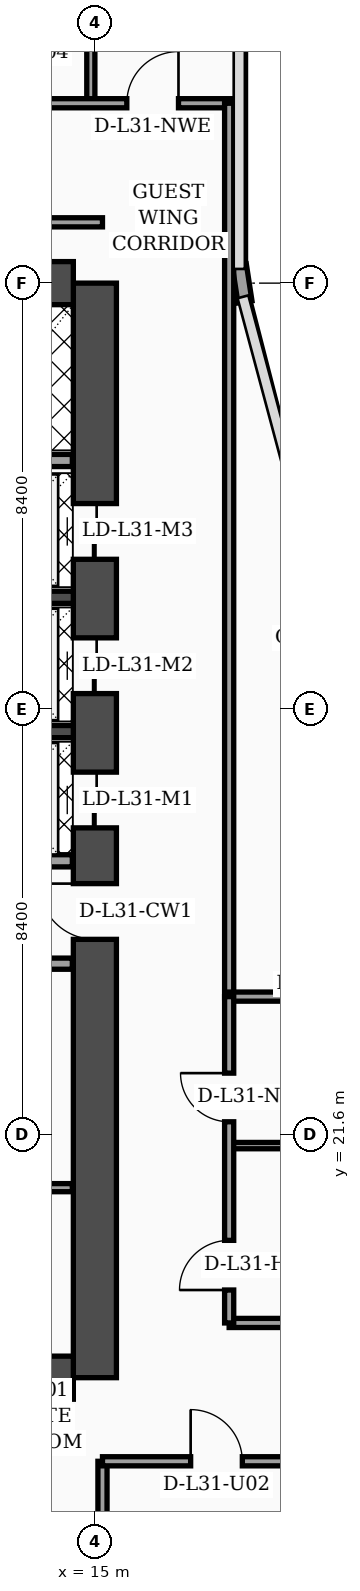
"""IFC4 building model, lengths in metres.
Left out: names, types, materials, properties, quantities, classifications, styles, units other than length and angle.
Written with IfcOpenShell. Run it as: python <this file> out.ifc"""

import sys

from ifc_helpers import new_model, si_unit, direction, frame, frame_2d, origin, place, context, subcontext, project, spatial, rectangle, extrude, element, fill, save


model = new_model("IFC4")
c1 = context("Model", 3, precision=1e-05, world=origin(), true_north=direction((0.0, 1.0)))
c2 = subcontext(c1, "Body", "Model", "MODEL_VIEW")
j1 = project(units=[si_unit("LENGTHUNIT", "METRE"), si_unit("PLANEANGLEUNIT", "RADIAN")], contexts=[c1])
p1 = place(None, origin())
s1 = spatial("IfcSite", under=j1, at=p1, CompositionType="ELEMENT")
p2 = place(p1, origin())
s2 = spatial("IfcBuilding", under=s1, at=p2, CompositionType="ELEMENT")
p3 = place(p2, frame((0.0, 0.0, 127.8)))
s3 = spatial("IfcBuildingStorey", under=s2, at=p3, CompositionType="ELEMENT", Elevation=127.8)
p4 = place(p3, frame((15.0, 16.8, 0.0), z_axis=(0.0, 0.0, 1.0), x_axis=(0.0, 1.0, 0.0)))
e1 = element("IfcWall", 1, at=p4, inside=s3, PredefinedType="SHEAR", context=c2, shape_type="SweptSolid", body=[
    extrude(rectangle(XDim=21.6, YDim=0.85, at=frame_2d((10.8, 0.0))), origin(), (0.0, 0.0, 1.0), 3.56),
])
p5 = place(p4, frame((8.65, 0.0, 0.0)))
e2 = element("IfcOpeningElement", 2, at=p5, cuts=e1, PredefinedType="OPENING", context=c2, shape_type="SweptSolid", body=[
    extrude(rectangle(XDim=1.1, YDim=2.2, at=frame_2d((0.55, 1.1))), frame((0.0, 0.435, 0.0), z_axis=(0.0, -1.0, 0.0), x_axis=(1.0, 0.0, 0.0)), (0.0, 0.0, 1.0), 0.87),
])
p6 = place(p4, frame((10.85, 0.0, 0.0)))
e3 = element("IfcOpeningElement", 3, at=p6, cuts=e1, PredefinedType="OPENING", context=c2, shape_type="SweptSolid", body=[
    extrude(rectangle(XDim=1.1, YDim=2.2, at=frame_2d((0.55, 1.1))), frame((0.0, 0.435, 0.0), z_axis=(0.0, -1.0, 0.0), x_axis=(1.0, 0.0, 0.0)), (0.0, 0.0, 1.0), 0.87),
])
p7 = place(p4, frame((13.5, 0.0, 0.0)))
e4 = element("IfcOpeningElement", 4, at=p7, cuts=e1, PredefinedType="OPENING", context=c2, shape_type="SweptSolid", body=[
    extrude(rectangle(XDim=1.1, YDim=2.2, at=frame_2d((0.55, 1.1))), frame((0.0, 0.435, 0.0), z_axis=(0.0, -1.0, 0.0), x_axis=(1.0, 0.0, 0.0)), (0.0, 0.0, 1.0), 0.87),
])
p8 = place(p4, frame((16.15, 0.0, 0.0)))
e5 = element("IfcOpeningElement", 5, at=p8, cuts=e1, PredefinedType="OPENING", context=c2, shape_type="SweptSolid", body=[
    extrude(rectangle(XDim=1.1, YDim=2.2, at=frame_2d((0.55, 1.1))), frame((0.0, 0.435, 0.0), z_axis=(0.0, -1.0, 0.0), x_axis=(1.0, 0.0, 0.0)), (0.0, 0.0, 1.0), 0.87),
])
for number, where, z_axis, x_axis in (
    (6, (4.625, 38.4, 0.0), (0.0, 0.0, 1.0), (1.0, 0.0, 0.0)),
    (7, (4.625, 16.8, 0.0), (0.0, 0.0, 1.0), (1.0, 0.0, 0.0)),
):
    element("IfcWall", number, at=place(p3, frame(where, z_axis=z_axis, x_axis=x_axis)), inside=s3, PredefinedType="SHEAR", context=c2, shape_type="SweptSolid", body=[
        extrude(rectangle(XDim=9.95, YDim=0.85, at=frame_2d((4.975, 0.0))), origin(), (0.0, 0.0, 1.0), 3.56),
    ])
for number, where, z_axis, x_axis in (
    (8, (12.18, 29.55, 0.0), (0.0, 0.0, 1.0), (1.0, 0.0, 0.0)),
    (9, (12.18, 32.2, 0.0), (0.0, 0.0, 1.0), (1.0, 0.0, 0.0)),
):
    element("IfcWall", number, at=place(p3, frame(where, z_axis=z_axis, x_axis=x_axis)), inside=s3, PredefinedType="SOLIDWALL", context=c2, shape_type="SweptSolid", body=[
        extrude(rectangle(XDim=2.395, YDim=0.24, at=frame_2d((1.198, 0.0))), origin(), (0.0, 0.0, 1.0), 3.56),
    ])
p9 = place(p3, frame((17.962, 38.03, 0.0), z_axis=(0.0, 0.0, 1.0), x_axis=(-0.15141125477, 0.988470855377, 0.0)))
e10 = element("IfcWall", 10, at=p9, inside=s3, PredefinedType="SOLIDWALL", context=c2, shape_type="SweptSolid", body=[
    extrude(rectangle(XDim=0.739, YDim=0.28, at=frame_2d((0.369, 0.0))), origin(), (0.0, 0.0, 1.0), 3.56),
])
p10 = place(p3, frame((9.68, 20.55, 0.0), z_axis=(0.0, 0.0, 1.0), x_axis=(1.0, 0.0, 0.0)))
e11 = element("IfcWall", 11, at=p10, inside=s3, PredefinedType="PARTITIONING", context=c2, shape_type="SweptSolid", body=[
    extrude(rectangle(XDim=4.875, YDim=0.16, at=frame_2d((2.438, 0.0))), origin(), (0.0, 0.0, 1.0), 3.56),
])
p11 = place(p10, frame((1.1, 0.0, 0.0)))
e12 = element("IfcOpeningElement", 12, at=p11, cuts=e11, PredefinedType="OPENING", context=c2, shape_type="SweptSolid", body=[
    extrude(rectangle(XDim=0.98, YDim=2.15, at=frame_2d((0.49, 1.075))), frame((0.0, 0.09, 0.0), z_axis=(0.0, -1.0, 0.0), x_axis=(1.0, 0.0, 0.0)), (0.0, 0.0, 1.0), 0.18),
])
p12 = place(p3, frame((9.68, 24.97, 0.0), z_axis=(0.0, 0.0, 1.0), x_axis=(1.0, 0.0, 0.0)))
e13 = element("IfcWall", 13, at=p12, inside=s3, PredefinedType="SOLIDWALL", context=c2, shape_type="SweptSolid", body=[
    extrude(rectangle(XDim=4.875, YDim=0.22, at=frame_2d((2.438, 0.0))), origin(), (0.0, 0.0, 1.0), 2.84),
])
p13 = place(p12, frame((0.9, 0.0, 0.0)))
e14 = element("IfcOpeningElement", 14, at=p13, cuts=e13, PredefinedType="OPENING", context=c2, shape_type="SweptSolid", body=[
    extrude(rectangle(XDim=0.98, YDim=2.15, at=frame_2d((0.49, 1.075))), frame((0.0, 0.12, 0.0), z_axis=(0.0, -1.0, 0.0), x_axis=(1.0, 0.0, 0.0)), (0.0, 0.0, 1.0), 0.24),
])
p14 = place(p3, frame((12.25, 27.0, 0.0), z_axis=(0.0, 0.0, 1.0), x_axis=(1.0, 0.0, 0.0)))
e15 = element("IfcWall", 15, at=p14, inside=s3, PredefinedType="SOLIDWALL", context=c2, shape_type="SweptSolid", body=[
    extrude(rectangle(XDim=2.305, YDim=0.24, at=frame_2d((1.152, 0.0))), origin(), (0.0, 0.0, 1.0), 3.56),
])
p15 = place(p3, frame((9.66, 34.9, 0.0), z_axis=(0.0, 0.0, 1.0), x_axis=(1.0, 0.0, 0.0)))
e16 = element("IfcWall", 16, at=p15, inside=s3, PredefinedType="SOLIDWALL", context=c2, shape_type="SweptSolid", body=[
    extrude(rectangle(XDim=4.895, YDim=0.24, at=frame_2d((2.448, 0.0))), origin(), (0.0, 0.0, 1.0), 3.56),
])
p16 = place(p3, frame((15.15, 2.44, 0.0), z_axis=(0.0, 0.0, 1.0), x_axis=(0.0, 1.0, 0.0)))
e17 = element("IfcWall", 17, at=p16, inside=s3, PredefinedType="PARTITIONING", context=c2, shape_type="SweptSolid", body=[
    extrude(rectangle(XDim=12.71, YDim=0.18, at=frame_2d((6.355, 0.0))), origin(), (0.0, 0.0, 1.0), 3.04),
])
p17 = place(p3, frame((15.15, 15.15, 0.0), z_axis=(0.0, 0.0, 1.0), x_axis=(1.0, 0.0, 0.0)))
e18 = element("IfcWall", 18, at=p17, inside=s3, PredefinedType="PARTITIONING", context=c2, shape_type="SweptSolid", body=[
    extrude(rectangle(XDim=6.45, YDim=0.18, at=frame_2d((3.225, 0.0))), origin(), (0.0, 0.0, 1.0), 2.49),
])
p18 = place(p17, frame((1.74, 0.0, 0.0)))
e19 = element("IfcOpeningElement", 19, at=p18, cuts=e18, PredefinedType="OPENING", context=c2, shape_type="SweptSolid", body=[
    extrude(rectangle(XDim=1.02, YDim=2.2, at=frame_2d((0.51, 1.1))), frame((0.0, 0.1, 0.0), z_axis=(0.0, -1.0, 0.0), x_axis=(1.0, 0.0, 0.0)), (0.0, 0.0, 1.0), 0.2),
])
p19 = place(p3, frame((14.92, 41.95, 0.0), z_axis=(0.0, 0.0, 1.0), x_axis=(0.0, 1.0, 0.0)))
e20 = element("IfcWall", 20, at=p19, inside=s3, PredefinedType="PARTITIONING", context=c2, shape_type="SweptSolid", body=[
    extrude(rectangle(XDim=5.85, YDim=0.16, at=frame_2d((2.925, 0.0))), origin(), (0.0, 0.0, 1.0), 3.04),
])
p20 = place(p3, frame((0.08, 41.95, 0.0), z_axis=(0.0, 0.0, 1.0), x_axis=(1.0, 0.0, 0.0)))
e21 = element("IfcWall", 21, at=p20, inside=s3, PredefinedType="PARTITIONING", context=c2, shape_type="SweptSolid", body=[
    extrude(rectangle(XDim=17.77, YDim=0.18, at=frame_2d((8.885, 0.0))), origin(), (0.0, 0.0, 1.0), 2.84),
])
p21 = place(p20, frame((0.9, 0.0, 0.0)))
e22 = element("IfcOpeningElement", 22, at=p21, cuts=e21, PredefinedType="OPENING", context=c2, shape_type="SweptSolid", body=[
    extrude(rectangle(XDim=1.02, YDim=2.2, at=frame_2d((0.51, 1.1))), frame((0.0, 0.1, 0.0), z_axis=(0.0, -1.0, 0.0), x_axis=(1.0, 0.0, 0.0)), (0.0, 0.0, 1.0), 0.2),
])
p22 = place(p20, frame((4.32, 0.0, 0.0)))
e23 = element("IfcOpeningElement", 23, at=p22, cuts=e21, PredefinedType="OPENING", context=c2, shape_type="SweptSolid", body=[
    extrude(rectangle(XDim=1.02, YDim=2.2, at=frame_2d((0.51, 1.1))), frame((0.0, 0.1, 0.0), z_axis=(0.0, -1.0, 0.0), x_axis=(1.0, 0.0, 0.0)), (0.0, 0.0, 1.0), 0.2),
])
p23 = place(p20, frame((10.21, 0.0, 0.0)))
e24 = element("IfcOpeningElement", 24, at=p23, cuts=e21, PredefinedType="OPENING", context=c2, shape_type="SweptSolid", body=[
    extrude(rectangle(XDim=1.02, YDim=2.2, at=frame_2d((0.51, 1.1))), frame((0.0, 0.1, 0.0), z_axis=(0.0, -1.0, 0.0), x_axis=(1.0, 0.0, 0.0)), (0.0, 0.0, 1.0), 0.2),
])
p24 = place(p20, frame((15.55, 0.0, 0.0)))
e25 = element("IfcOpeningElement", 25, at=p24, cuts=e21, PredefinedType="OPENING", context=c2, shape_type="SweptSolid", body=[
    extrude(rectangle(XDim=1.02, YDim=2.2, at=frame_2d((0.51, 1.1))), frame((0.0, 0.1, 0.0), z_axis=(0.0, -1.0, 0.0), x_axis=(1.0, 0.0, 0.0)), (0.0, 0.0, 1.0), 0.2),
])
p25 = place(p3, frame((17.65, 24.3, 0.0), z_axis=(0.0, 0.0, 1.0), x_axis=(0.0, 1.0, 0.0)))
e26 = element("IfcWall", 26, at=p25, inside=s3, PredefinedType="PARTITIONING", context=c2, shape_type="SweptSolid", body=[
    extrude(rectangle(XDim=17.65, YDim=0.18, at=frame_2d((8.825, 0.0))), origin(), (0.0, 0.0, 1.0), 2.84),
])
p26 = place(p3, frame((3.755, 39.6, 0.0), z_axis=(0.0, 0.0, 1.0), x_axis=(1.0, 0.0, 0.0)))
e27 = element("IfcWall", 27, at=p26, inside=s3, PredefinedType="PARTITIONING", context=c2, shape_type="SweptSolid", body=[
    extrude(rectangle(XDim=11.395, YDim=0.18, at=frame_2d((5.698, 0.0))), origin(), (0.0, 0.0, 1.0), 2.84),
])
p27 = place(p3, frame((17.65, 17.88, 0.0), z_axis=(0.0, 0.0, 1.0), x_axis=(1.0, 0.0, 0.0)))
e28 = element("IfcWall", 28, at=p27, inside=s3, PredefinedType="PARTITIONING", context=c2, shape_type="SweptSolid", body=[
    extrude(rectangle(XDim=3.9, YDim=0.18, at=frame_2d((1.95, 0.0))), origin(), (0.0, 0.0, 1.0), 3.09),
])
p28 = place(p3, frame((17.65, 21.38, 0.0), z_axis=(0.0, 0.0, 1.0), x_axis=(1.0, 0.0, 0.0)))
e29 = element("IfcWall", 29, at=p28, inside=s3, PredefinedType="PARTITIONING", context=c2, shape_type="SweptSolid", body=[
    extrude(rectangle(XDim=3.9, YDim=0.125, at=frame_2d((1.95, 0.0))), origin(), (0.0, 0.0, 1.0), 3.56),
])
p29 = place(p3, frame((17.65, 24.32, 0.0), z_axis=(0.0, 0.0, 1.0), x_axis=(1.0, 0.0, 0.0)))
e30 = element("IfcWall", 30, at=p29, inside=s3, PredefinedType="PARTITIONING", context=c2, shape_type="SweptSolid", body=[
    extrude(rectangle(XDim=3.95, YDim=0.18, at=frame_2d((1.975, 0.0))), origin(), (0.0, 0.0, 1.0), 3.56),
])
p30 = place(p3, frame((17.65, 17.88, 0.0), z_axis=(0.0, 0.0, 1.0), x_axis=(0.0, 1.0, 0.0)))
e31 = element("IfcWall", 31, at=p30, inside=s3, PredefinedType="PARTITIONING", context=c2, shape_type="SweptSolid", body=[
    extrude(rectangle(XDim=6.44, YDim=0.18, at=frame_2d((3.22, 0.0))), origin(), (0.0, 0.0, 1.0), 3.09),
])
p31 = place(p30, frame((0.65, 0.0, 0.0)))
e32 = element("IfcOpeningElement", 32, at=p31, cuts=e31, PredefinedType="OPENING", context=c2, shape_type="SweptSolid", body=[
    extrude(rectangle(XDim=0.98, YDim=2.15, at=frame_2d((0.49, 1.075))), frame((0.0, 0.1, 0.0), z_axis=(0.0, -1.0, 0.0), x_axis=(1.0, 0.0, 0.0)), (0.0, 0.0, 1.0), 0.2),
])
p32 = place(p30, frame((3.97, 0.0, 0.0)))
e33 = element("IfcOpeningElement", 33, at=p32, cuts=e31, PredefinedType="OPENING", context=c2, shape_type="SweptSolid", body=[
    extrude(rectangle(XDim=0.96, YDim=2.2, at=frame_2d((0.48, 1.1))), frame((0.0, 0.1, 0.0), z_axis=(0.0, -1.0, 0.0), x_axis=(1.0, 0.0, 0.0)), (0.0, 0.0, 1.0), 0.2),
])
p33 = place(p18, origin())
e34 = element("IfcDoor", 34, at=p33, inside=s3, OperationType="SINGLE_SWING_LEFT", PredefinedType="DOOR", context=c2, shape_type="SweptSolid", body=[
    extrude(rectangle(XDim=1.02, YDim=2.2, at=frame_2d((0.51, 1.1))), frame((0.0, 0.025, 0.0), z_axis=(0.0, -1.0, 0.0), x_axis=(1.0, 0.0, 0.0)), (0.0, 0.0, 1.0), 0.05),
])
fill(e19, e34)
p34 = place(p24, origin())
e35 = element("IfcDoor", 35, at=p34, inside=s3, OperationType="SINGLE_SWING_RIGHT", PredefinedType="DOOR", context=c2, shape_type="SweptSolid", body=[
    extrude(rectangle(XDim=1.02, YDim=2.2, at=frame_2d((0.51, 1.1))), frame((0.0, 0.025, 0.0), z_axis=(0.0, -1.0, 0.0), x_axis=(1.0, 0.0, 0.0)), (0.0, 0.0, 1.0), 0.05),
])
fill(e25, e35)
p35 = place(p31, origin())
e36 = element("IfcDoor", 36, at=p35, inside=s3, OperationType="SINGLE_SWING_LEFT", PredefinedType="DOOR", context=c2, shape_type="SweptSolid", body=[
    extrude(rectangle(XDim=0.98, YDim=2.15, at=frame_2d((0.49, 1.075))), frame((0.0, 0.025, 0.0), z_axis=(0.0, -1.0, 0.0), x_axis=(1.0, 0.0, 0.0)), (0.0, 0.0, 1.0), 0.05),
])
fill(e32, e36)
p36 = place(p32, origin())
e37 = element("IfcDoor", 37, at=p36, inside=s3, OperationType="SINGLE_SWING_RIGHT", PredefinedType="DOOR", context=c2, shape_type="SweptSolid", body=[
    extrude(rectangle(XDim=0.96, YDim=2.2, at=frame_2d((0.48, 1.1))), frame((0.0, 0.025, 0.0), z_axis=(0.0, -1.0, 0.0), x_axis=(1.0, 0.0, 0.0)), (0.0, 0.0, 1.0), 0.05),
])
fill(e33, e37)
p37 = place(p5, origin())
e38 = element("IfcDoor", 38, at=p37, inside=s3, OperationType="SINGLE_SWING_RIGHT", PredefinedType="DOOR", context=c2, shape_type="SweptSolid", body=[
    extrude(rectangle(XDim=1.1, YDim=2.2, at=frame_2d((0.55, 1.1))), frame((0.0, 0.025, 0.0), z_axis=(0.0, -1.0, 0.0), x_axis=(1.0, 0.0, 0.0)), (0.0, 0.0, 1.0), 0.05),
])
fill(e2, e38)
p38 = place(p6, origin())
e39 = element("IfcDoor", 39, at=p38, inside=s3, OperationType="DOUBLE_DOOR_SLIDING", PredefinedType="DOOR", context=c2, shape_type="SweptSolid", body=[
    extrude(rectangle(XDim=1.1, YDim=2.2, at=frame_2d((0.55, 1.1))), frame((0.0, 0.025, 0.0), z_axis=(0.0, -1.0, 0.0), x_axis=(1.0, 0.0, 0.0)), (0.0, 0.0, 1.0), 0.05),
])
fill(e3, e39)
p39 = place(p7, origin())
e40 = element("IfcDoor", 40, at=p39, inside=s3, OperationType="DOUBLE_DOOR_SLIDING", PredefinedType="DOOR", context=c2, shape_type="SweptSolid", body=[
    extrude(rectangle(XDim=1.1, YDim=2.2, at=frame_2d((0.55, 1.1))), frame((0.0, 0.025, 0.0), z_axis=(0.0, -1.0, 0.0), x_axis=(1.0, 0.0, 0.0)), (0.0, 0.0, 1.0), 0.05),
])
fill(e4, e40)
p40 = place(p8, origin())
e41 = element("IfcDoor", 41, at=p40, inside=s3, OperationType="DOUBLE_DOOR_SLIDING", PredefinedType="DOOR", context=c2, shape_type="SweptSolid", body=[
    extrude(rectangle(XDim=1.1, YDim=2.2, at=frame_2d((0.55, 1.1))), frame((0.0, 0.025, 0.0), z_axis=(0.0, -1.0, 0.0), x_axis=(1.0, 0.0, 0.0)), (0.0, 0.0, 1.0), 0.05),
])
fill(e5, e41)
save(model, sys.argv[1])
